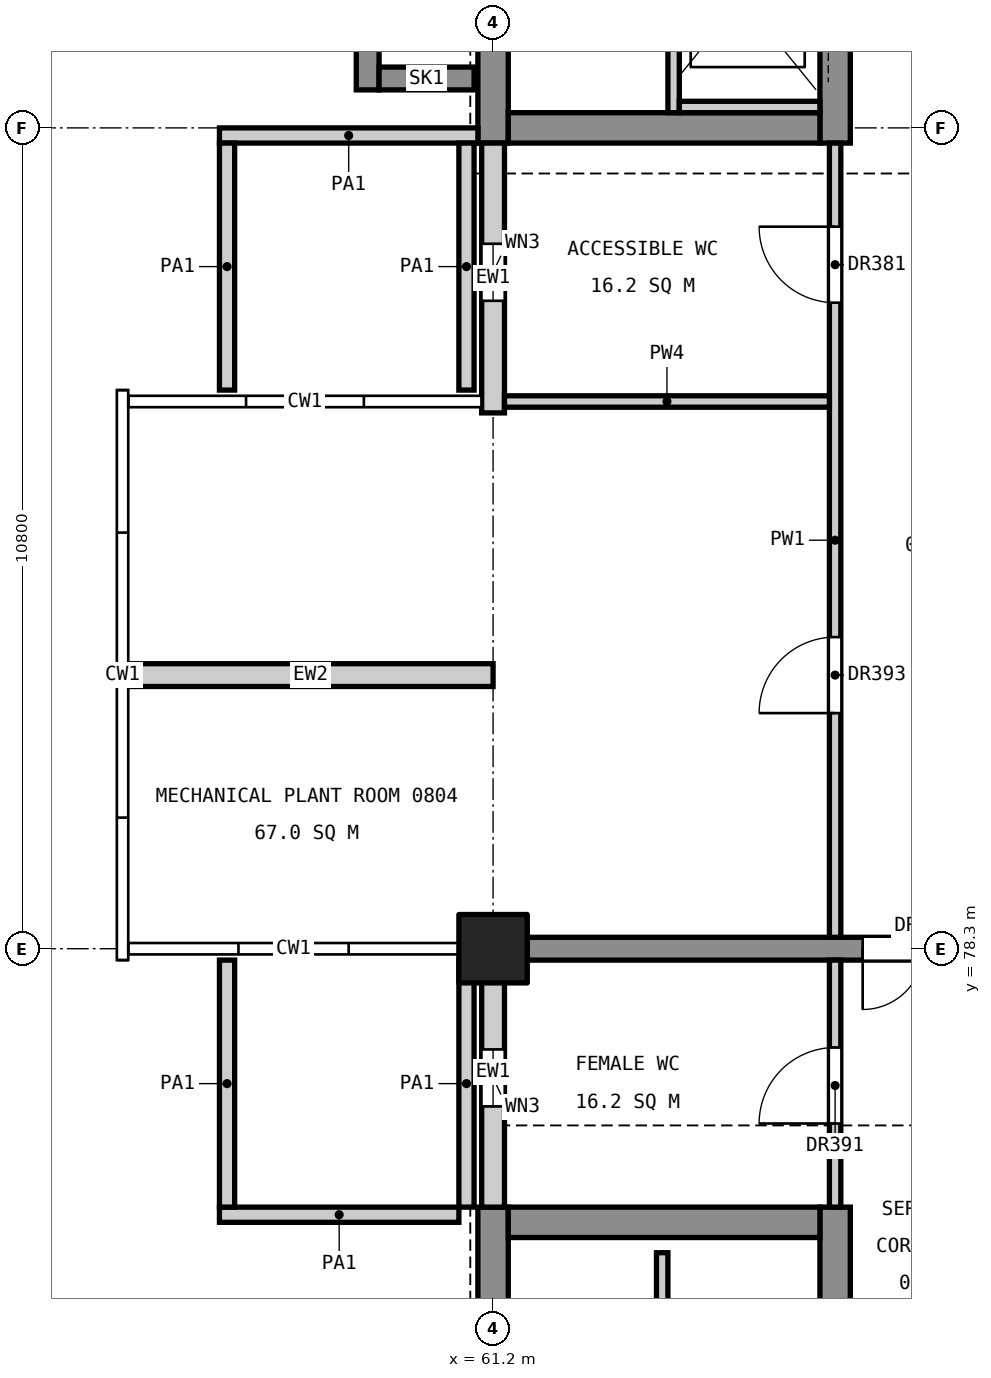
"""IFC4 building model, lengths in metres.
Left out: names, types, materials, properties, quantities, classifications, styles, units other than length and angle.
Written with IfcOpenShell. Run it as: python <this file> out.ifc"""

import sys

from ifc_helpers import new_model, si_unit, direction, frame, frame_2d, origin, origin_2d, place, context, subcontext, project, spatial, rectangle, extrude, element, fill, save


model = new_model("IFC4")
c1 = context("Model", 3, precision=1e-05, world=origin(), true_north=direction((0.0, 1.0)))
c2 = subcontext(c1, "Body", "Model", "MODEL_VIEW")
j1 = project(units=[si_unit("LENGTHUNIT", "METRE"), si_unit("PLANEANGLEUNIT", "RADIAN")], contexts=[c1])
p1 = place(None, origin())
s1 = spatial("IfcSite", under=j1, at=p1, CompositionType="ELEMENT")
p2 = place(p1, origin())
s2 = spatial("IfcBuilding", under=s1, at=p2, CompositionType="ELEMENT")
p3 = place(p2, frame((0.0, 0.0, 41.4)))
s3 = spatial("IfcBuildingStorey", under=s2, at=p3, CompositionType="ELEMENT", Elevation=41.4)
p4 = place(p3, frame((61.2, 78.3, 0.0), z_axis=(0.0, 0.0, 1.0), x_axis=(1.0, 0.0, 0.0)))
e1 = element("IfcColumn", 1, at=p4, inside=s3, PredefinedType="COLUMN", context=c2, shape_type="SweptSolid", body=[
    extrude(rectangle(XDim=0.9, YDim=0.9, at=origin_2d()), origin(), (0.0, 0.0, 1.0), 4.8),
])
p5 = place(p3, frame((61.2, 60.1, 0.0), z_axis=(0.0, 0.0, 1.0), x_axis=(0.0, 1.0, 0.0)))
e2 = element("IfcWall", 2, at=p5, inside=s3, PredefinedType="SHEAR", context=c2, shape_type="SweptSolid", body=[
    extrude(rectangle(XDim=14.8, YDim=0.4, at=frame_2d((7.4, 0.0))), origin(), (0.0, 0.0, 1.0), 4.55),
])
p6 = place(p5, frame((6.11, 0.0, 3.4)))
e3 = element("IfcOpeningElement", 3, at=p6, cuts=e2, PredefinedType="OPENING", context=c2, shape_type="SweptSolid", body=[
    extrude(rectangle(XDim=1.2, YDim=0.9, at=frame_2d((0.6, 0.45))), frame((0.0, 0.21, 0.0), z_axis=(0.0, -1.0, 0.0), x_axis=(1.0, 0.0, 0.0)), (0.0, 0.0, 1.0), 0.42),
])
p7 = place(p3, frame((65.7, 60.1, 0.0), z_axis=(0.0, 0.0, 1.0), x_axis=(0.0, 1.0, 0.0)))
e4 = element("IfcWall", 4, at=p7, inside=s3, PredefinedType="SHEAR", context=c2, shape_type="SweptSolid", body=[
    extrude(rectangle(XDim=14.8, YDim=0.4, at=frame_2d((7.4, 0.0))), origin(), (0.0, 0.0, 1.0), 4.55),
])
p8 = place(p7, frame((0.5, 0.0, 0.0)))
e5 = element("IfcOpeningElement", 5, at=p8, cuts=e4, PredefinedType="OPENING", context=c2, shape_type="SweptSolid", body=[
    extrude(rectangle(XDim=1.4, YDim=2.1, at=frame_2d((0.7, 1.05))), frame((0.0, 0.21, 0.0), z_axis=(0.0, -1.0, 0.0), x_axis=(1.0, 0.0, 0.0)), (0.0, 0.0, 1.0), 0.42),
])
p9 = place(p7, frame((8.8, 0.0, 0.0)))
e6 = element("IfcOpeningElement", 6, at=p9, cuts=e4, PredefinedType="OPENING", context=c2, shape_type="SweptSolid", body=[
    extrude(rectangle(XDim=1.1, YDim=2.1, at=frame_2d((0.55, 1.05))), frame((0.0, 0.21, 0.0), z_axis=(0.0, -1.0, 0.0), x_axis=(1.0, 0.0, 0.0)), (0.0, 0.0, 1.0), 0.42),
])
p10 = place(p7, frame((11.35, 0.0, 0.0)))
e7 = element("IfcOpeningElement", 7, at=p10, cuts=e4, PredefinedType="OPENING", context=c2, shape_type="SweptSolid", body=[
    extrude(rectangle(XDim=1.1, YDim=2.1, at=frame_2d((0.55, 1.05))), frame((0.0, 0.21, 0.0), z_axis=(0.0, -1.0, 0.0), x_axis=(1.0, 0.0, 0.0)), (0.0, 0.0, 1.0), 0.42),
])
p11 = place(p3, frame((61.4, 74.7, 0.0), z_axis=(0.0, 0.0, 1.0), x_axis=(1.0, 0.0, 0.0)))
e8 = element("IfcWall", 8, at=p11, inside=s3, PredefinedType="SHEAR", context=c2, shape_type="SweptSolid", body=[
    extrude(rectangle(XDim=4.1, YDim=0.4, at=frame_2d((2.05, 0.0))), origin(), (0.0, 0.0, 1.0), 4.55),
])
p12 = place(p3, frame((61.2, 88.9, 0.0), z_axis=(0.0, 0.0, 1.0), x_axis=(0.0, 1.0, 0.0)))
e9 = element("IfcWall", 9, at=p12, inside=s3, PredefinedType="SHEAR", context=c2, shape_type="SweptSolid", body=[
    extrude(rectangle(XDim=11.2, YDim=0.4, at=frame_2d((5.6, 0.0))), origin(), (0.0, 0.0, 1.0), 4.55),
])
p13 = place(p12, frame((3.89, 0.0, 3.4)))
e10 = element("IfcOpeningElement", 10, at=p13, cuts=e9, PredefinedType="OPENING", context=c2, shape_type="SweptSolid", body=[
    extrude(rectangle(XDim=1.2, YDim=0.9, at=frame_2d((0.6, 0.45))), frame((0.0, 0.21, 0.0), z_axis=(0.0, -1.0, 0.0), x_axis=(1.0, 0.0, 0.0)), (0.0, 0.0, 1.0), 0.42),
])
p14 = place(p3, frame((65.7, 88.9, 0.0), z_axis=(0.0, 0.0, 1.0), x_axis=(0.0, 1.0, 0.0)))
e11 = element("IfcWall", 11, at=p14, inside=s3, PredefinedType="SHEAR", context=c2, shape_type="SweptSolid", body=[
    extrude(rectangle(XDim=11.2, YDim=0.4, at=frame_2d((5.6, 0.0))), origin(), (0.0, 0.0, 1.0), 4.55),
])
p15 = place(p14, frame((9.3, 0.0, 0.0)))
e12 = element("IfcOpeningElement", 12, at=p15, cuts=e11, PredefinedType="OPENING", context=c2, shape_type="SweptSolid", body=[
    extrude(rectangle(XDim=1.4, YDim=2.1, at=frame_2d((0.7, 1.05))), frame((0.0, 0.21, 0.0), z_axis=(0.0, -1.0, 0.0), x_axis=(1.0, 0.0, 0.0)), (0.0, 0.0, 1.0), 0.42),
])
p16 = place(p14, frame((1.35, 0.0, 0.0)))
e13 = element("IfcOpeningElement", 13, at=p16, cuts=e11, PredefinedType="OPENING", context=c2, shape_type="SweptSolid", body=[
    extrude(rectangle(XDim=1.1, YDim=2.1, at=frame_2d((0.55, 1.05))), frame((0.0, 0.21, 0.0), z_axis=(0.0, -1.0, 0.0), x_axis=(1.0, 0.0, 0.0)), (0.0, 0.0, 1.0), 0.42),
])
p17 = place(p3, frame((61.4, 89.1, 0.0), z_axis=(0.0, 0.0, 1.0), x_axis=(1.0, 0.0, 0.0)))
e14 = element("IfcWall", 14, at=p17, inside=s3, PredefinedType="SHEAR", context=c2, shape_type="SweptSolid", body=[
    extrude(rectangle(XDim=4.1, YDim=0.4, at=frame_2d((2.05, 0.0))), origin(), (0.0, 0.0, 1.0), 4.55),
])
p18 = place(p3, frame((59.55, 89.6, 0.0), z_axis=(0.0, 0.0, 1.0), x_axis=(0.0, 1.0, 0.0)))
e15 = element("IfcWall", 15, at=p18, inside=s3, PredefinedType="SHEAR", context=c2, shape_type="SweptSolid", body=[
    extrude(rectangle(XDim=2.4, YDim=0.3, at=frame_2d((1.2, 0.0))), origin(), (0.0, 0.0, 1.0), 4.8),
])
p19 = place(p3, frame((60.95, 89.75, 0.0), z_axis=(0.0, 0.0, 1.0), x_axis=(-1.0, 0.0, 0.0)))
e16 = element("IfcWall", 16, at=p19, inside=s3, PredefinedType="SHEAR", context=c2, shape_type="SweptSolid", body=[
    extrude(rectangle(XDim=1.25, YDim=0.3, at=frame_2d((0.625, 0.0))), origin(), (0.0, 0.0, 1.0), 4.8),
])
p20 = place(p3, frame((61.65, 78.3, 0.0), z_axis=(0.0, 0.0, 1.0), x_axis=(1.0, 0.0, 0.0)))
e17 = element("IfcWall", 17, at=p20, inside=s3, PredefinedType="SHEAR", context=c2, shape_type="SweptSolid", body=[
    extrude(rectangle(XDim=6.3, YDim=0.3, at=frame_2d((3.15, 0.0))), origin(), (0.0, 0.0, 1.0), 4.55),
])
p21 = place(p20, frame((4.413, 0.0, 0.0)))
e18 = element("IfcOpeningElement", 18, at=p21, cuts=e17, PredefinedType="OPENING", context=c2, shape_type="SweptSolid", body=[
    extrude(rectangle(XDim=1.6, YDim=2.1, at=frame_2d((0.8, 1.05))), frame((0.0, 0.16, 0.0), z_axis=(0.0, -1.0, 0.0), x_axis=(1.0, 0.0, 0.0)), (0.0, 0.0, 1.0), 0.32),
])
p22 = place(p3, frame((63.575, 92.0, 0.0), z_axis=(0.0, 0.0, 1.0), x_axis=(0.0, -1.0, 0.0)))
e19 = element("IfcWall", 19, at=p22, inside=s3, PredefinedType="SOLIDWALL", context=c2, shape_type="SweptSolid", body=[
    extrude(rectangle(XDim=2.7, YDim=0.15, at=frame_2d((1.35, 0.0))), origin(), (0.0, 0.0, 1.0), 4.8),
])
p23 = place(p3, frame((63.65, 89.375, 0.0), z_axis=(0.0, 0.0, 1.0), x_axis=(1.0, 0.0, 0.0)))
e20 = element("IfcWall", 20, at=p23, inside=s3, PredefinedType="SOLIDWALL", context=c2, shape_type="SweptSolid", body=[
    extrude(rectangle(XDim=1.85, YDim=0.15, at=frame_2d((0.925, 0.0))), origin(), (0.0, 0.0, 1.0), 4.8),
])
p24 = place(p3, frame((63.425, 73.3, 0.0), z_axis=(0.0, 0.0, 1.0), x_axis=(0.0, 1.0, 0.0)))
e21 = element("IfcWall", 21, at=p24, inside=s3, PredefinedType="SOLIDWALL", context=c2, shape_type="SweptSolid", body=[
    extrude(rectangle(XDim=1.0, YDim=0.15, at=frame_2d((0.5, 0.0))), origin(), (0.0, 0.0, 1.0), 4.8),
])
p25 = place(p3, frame((60.85, 78.15, 0.0), z_axis=(0.0, 0.0, 1.0), x_axis=(0.0, -1.0, 0.0)))
e22 = element("IfcWall", 22, at=p25, inside=s3, PredefinedType="PARAPET", context=c2, shape_type="SweptSolid", body=[
    extrude(rectangle(XDim=3.25, YDim=0.2, at=frame_2d((1.625, 0.0))), origin(), (0.0, 0.0, 1.0), 1.2),
])
p26 = place(p3, frame((60.75, 74.8, 0.0), z_axis=(0.0, 0.0, 1.0), x_axis=(-1.0, 0.0, 0.0)))
e23 = element("IfcWall", 23, at=p26, inside=s3, PredefinedType="PARAPET", context=c2, shape_type="SweptSolid", body=[
    extrude(rectangle(XDim=3.15, YDim=0.2, at=frame_2d((1.575, 0.0))), origin(), (0.0, 0.0, 1.0), 1.2),
])
p27 = place(p3, frame((57.7, 74.9, 0.0), z_axis=(0.0, 0.0, 1.0), x_axis=(0.0, 1.0, 0.0)))
e24 = element("IfcWall", 24, at=p27, inside=s3, PredefinedType="PARAPET", context=c2, shape_type="SweptSolid", body=[
    extrude(rectangle(XDim=3.25, YDim=0.2, at=frame_2d((1.625, 0.0))), origin(), (0.0, 0.0, 1.0), 1.2),
])
p28 = place(p3, frame((57.6, 89.0, 0.0), z_axis=(0.0, 0.0, 1.0), x_axis=(1.0, 0.0, 0.0)))
e25 = element("IfcWall", 25, at=p28, inside=s3, PredefinedType="PARAPET", context=c2, shape_type="SweptSolid", body=[
    extrude(rectangle(XDim=3.4, YDim=0.2, at=frame_2d((1.7, 0.0))), origin(), (0.0, 0.0, 1.0), 1.2),
])
for number, where, z_axis, x_axis in (
    (26, (60.85, 88.9, 0.0), (0.0, 0.0, 1.0), (0.0, -1.0, 0.0)),
    (27, (57.7, 85.65, 0.0), (0.0, 0.0, 1.0), (0.0, 1.0, 0.0)),
):
    element("IfcWall", number, at=place(p3, frame(where, z_axis=z_axis, x_axis=x_axis)), inside=s3, PredefinedType="PARAPET", context=c2, shape_type="SweptSolid", body=[
        extrude(rectangle(XDim=3.25, YDim=0.2, at=frame_2d((1.625, 0.0))), origin(), (0.0, 0.0, 1.0), 1.2),
    ])
p29 = place(p3, frame((61.2, 74.9, 0.0), z_axis=(0.0, 0.0, 1.0), x_axis=(0.0, 1.0, 0.0)))
e28 = element("IfcWall", 28, at=p29, inside=s3, PredefinedType="STANDARD", context=c2, shape_type="SweptSolid", body=[
    extrude(rectangle(XDim=3.55, YDim=0.3, at=frame_2d((1.775, 0.0))), origin(), (0.0, 0.0, 1.0), 3.65),
])
p30 = place(p29, frame((1.325, 0.0, 0.8)))
e29 = element("IfcOpeningElement", 29, at=p30, cuts=e28, PredefinedType="OPENING", context=c2, shape_type="SweptSolid", body=[
    extrude(rectangle(XDim=0.75, YDim=1.2, at=frame_2d((0.375, 0.6))), frame((0.0, 0.16, 0.0), z_axis=(0.0, -1.0, 0.0), x_axis=(1.0, 0.0, 0.0)), (0.0, 0.0, 1.0), 0.32),
])
p31 = place(p3, frame((61.2, 85.35, 0.0), z_axis=(0.0, 0.0, 1.0), x_axis=(0.0, 1.0, 0.0)))
e30 = element("IfcWall", 30, at=p31, inside=s3, PredefinedType="STANDARD", context=c2, shape_type="SweptSolid", body=[
    extrude(rectangle(XDim=3.55, YDim=0.3, at=frame_2d((1.775, 0.0))), origin(), (0.0, 0.0, 1.0), 3.65),
])
p32 = place(p31, frame((1.475, 0.0, 0.8)))
e31 = element("IfcOpeningElement", 31, at=p32, cuts=e30, PredefinedType="OPENING", context=c2, shape_type="SweptSolid", body=[
    extrude(rectangle(XDim=0.75, YDim=1.2, at=frame_2d((0.375, 0.6))), frame((0.0, 0.16, 0.0), z_axis=(0.0, -1.0, 0.0), x_axis=(1.0, 0.0, 0.0)), (0.0, 0.0, 1.0), 0.32),
])
p33 = place(p3, frame((56.4, 81.9, 0.0), z_axis=(0.0, 0.0, 1.0), x_axis=(1.0, 0.0, 0.0)))
e32 = element("IfcWall", 32, at=p33, inside=s3, PredefinedType="STANDARD", context=c2, shape_type="SweptSolid", body=[
    extrude(rectangle(XDim=4.8, YDim=0.3, at=frame_2d((2.4, 0.0))), origin(), (0.0, 0.0, 1.0), 3.65),
])
p34 = place(p3, frame((65.7, 74.9, 0.0), z_axis=(0.0, 0.0, 1.0), x_axis=(0.0, 1.0, 0.0)))
e33 = element("IfcWall", 33, at=p34, inside=s3, PredefinedType="PARTITIONING", context=c2, shape_type="SweptSolid", body=[
    extrude(rectangle(XDim=3.25, YDim=0.15, at=frame_2d((1.625, 0.0))), origin(), (0.0, 0.0, 1.0), 3.55),
])
p35 = place(p34, frame((1.1, 0.0, 0.0)))
e34 = element("IfcOpeningElement", 34, at=p35, cuts=e33, PredefinedType="OPENING", context=c2, shape_type="SweptSolid", body=[
    extrude(rectangle(XDim=1.0, YDim=2.1, at=frame_2d((0.5, 1.05))), frame((0.0, 0.085, 0.0), z_axis=(0.0, -1.0, 0.0), x_axis=(1.0, 0.0, 0.0)), (0.0, 0.0, 1.0), 0.17),
])
p36 = place(p3, frame((65.7, 78.45, 0.0), z_axis=(0.0, 0.0, 1.0), x_axis=(0.0, 1.0, 0.0)))
e35 = element("IfcWall", 35, at=p36, inside=s3, PredefinedType="PARTITIONING", context=c2, shape_type="SweptSolid", body=[
    extrude(rectangle(XDim=10.45, YDim=0.15, at=frame_2d((5.225, 0.0))), origin(), (0.0, 0.0, 1.0), 3.55),
])
p37 = place(p36, frame((8.35, 0.0, 0.0)))
e36 = element("IfcOpeningElement", 36, at=p37, cuts=e35, PredefinedType="OPENING", context=c2, shape_type="SweptSolid", body=[
    extrude(rectangle(XDim=1.0, YDim=2.1, at=frame_2d((0.5, 1.05))), frame((0.0, 0.085, 0.0), z_axis=(0.0, -1.0, 0.0), x_axis=(1.0, 0.0, 0.0)), (0.0, 0.0, 1.0), 0.17),
])
p38 = place(p36, frame((2.95, 0.0, 0.0)))
e37 = element("IfcOpeningElement", 37, at=p38, cuts=e35, PredefinedType="OPENING", context=c2, shape_type="SweptSolid", body=[
    extrude(rectangle(XDim=1.0, YDim=2.1, at=frame_2d((0.5, 1.05))), frame((0.0, 0.085, 0.0), z_axis=(0.0, -1.0, 0.0), x_axis=(1.0, 0.0, 0.0)), (0.0, 0.0, 1.0), 0.17),
])
p39 = place(p3, frame((61.35, 85.5, 0.0), z_axis=(0.0, 0.0, 1.0), x_axis=(1.0, 0.0, 0.0)))
e38 = element("IfcWall", 38, at=p39, inside=s3, PredefinedType="PARTITIONING", context=c2, shape_type="SweptSolid", body=[
    extrude(rectangle(XDim=4.275, YDim=0.15, at=frame_2d((2.137, 0.0))), origin(), (0.0, 0.0, 1.0), 3.85),
])
p40 = place(p30, origin())
e39 = element("IfcWindow", 39, at=p40, inside=s3, PartitioningType="SINGLE_PANEL", PredefinedType="WINDOW", context=c2, shape_type="SweptSolid", body=[
    extrude(rectangle(XDim=0.75, YDim=1.2, at=frame_2d((0.375, 0.6))), frame((0.0, 0.03, 0.0), z_axis=(0.0, -1.0, 0.0), x_axis=(1.0, 0.0, 0.0)), (0.0, 0.0, 1.0), 0.06),
])
fill(e29, e39)
p41 = place(p32, origin())
e40 = element("IfcWindow", 40, at=p41, inside=s3, PartitioningType="SINGLE_PANEL", PredefinedType="WINDOW", context=c2, shape_type="SweptSolid", body=[
    extrude(rectangle(XDim=0.75, YDim=1.2, at=frame_2d((0.375, 0.6))), frame((0.0, 0.03, 0.0), z_axis=(0.0, -1.0, 0.0), x_axis=(1.0, 0.0, 0.0)), (0.0, 0.0, 1.0), 0.06),
])
fill(e31, e40)
p42 = place(p37, origin())
e41 = element("IfcDoor", 41, at=p42, inside=s3, OperationType="SINGLE_SWING_RIGHT", PredefinedType="DOOR", context=c2, shape_type="SweptSolid", body=[
    extrude(rectangle(XDim=1.0, YDim=2.1, at=frame_2d((0.5, 1.05))), frame((0.0, 0.025, 0.0), z_axis=(0.0, -1.0, 0.0), x_axis=(1.0, 0.0, 0.0)), (0.0, 0.0, 1.0), 0.05),
])
fill(e36, e41)
p43 = place(p35, origin())
e42 = element("IfcDoor", 42, at=p43, inside=s3, OperationType="SINGLE_SWING_LEFT", PredefinedType="DOOR", context=c2, shape_type="SweptSolid", body=[
    extrude(rectangle(XDim=1.0, YDim=2.1, at=frame_2d((0.5, 1.05))), frame((0.0, 0.025, 0.0), z_axis=(0.0, -1.0, 0.0), x_axis=(1.0, 0.0, 0.0)), (0.0, 0.0, 1.0), 0.05),
])
fill(e34, e42)
p44 = place(p38, origin())
e43 = element("IfcDoor", 43, at=p44, inside=s3, OperationType="SINGLE_SWING_LEFT", PredefinedType="DOOR", context=c2, shape_type="SweptSolid", body=[
    extrude(rectangle(XDim=1.0, YDim=2.1, at=frame_2d((0.5, 1.05))), frame((0.0, 0.025, 0.0), z_axis=(0.0, -1.0, 0.0), x_axis=(1.0, 0.0, 0.0)), (0.0, 0.0, 1.0), 0.05),
])
fill(e37, e43)
p45 = place(p21, frame((1.6, 0.0, 0.0), z_axis=(0.0, 0.0, 1.0), x_axis=(-1.0, 0.0, 0.0)))
e44 = element("IfcDoor", 44, at=p45, inside=s3, OperationType="DOUBLE_DOOR_SINGLE_SWING", PredefinedType="DOOR", context=c2, shape_type="SweptSolid", body=[
    extrude(rectangle(XDim=1.6, YDim=2.1, at=frame_2d((0.8, 1.05))), frame((0.0, 0.025, 0.0), z_axis=(0.0, -1.0, 0.0), x_axis=(1.0, 0.0, 0.0)), (0.0, 0.0, 1.0), 0.05),
])
fill(e18, e44)
save(model, sys.argv[1])
